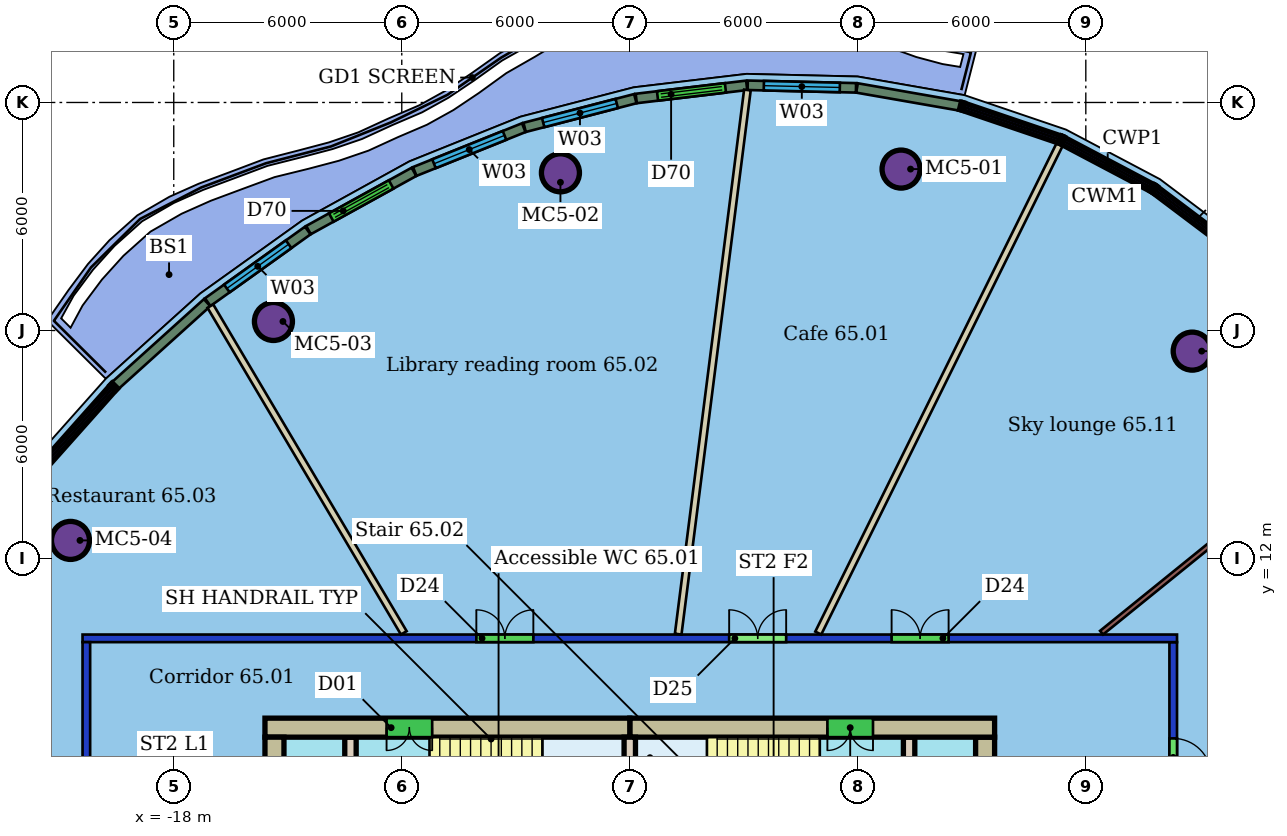
"""IFC4 building model, lengths in metres.
Left out: names, types, materials, properties, quantities, classifications, styles, units other than length and angle.
Written with IfcOpenShell. Run it as: python <this file> out.ifc"""

import sys

from ifc_helpers import new_model, si_unit, direction, frame, frame_2d, origin, origin_2d, place, context, subcontext, project, spatial, rectangle, hollow_circle, extrude, element, fill, save


model = new_model("IFC4")
c1 = context("Model", 3, precision=1e-05, world=origin(), true_north=direction((0.0, 1.0)))
c2 = subcontext(c1, "Body", "Model", "MODEL_VIEW")
j1 = project(units=[si_unit("LENGTHUNIT", "METRE"), si_unit("PLANEANGLEUNIT", "RADIAN")], contexts=[c1])
p1 = place(None, origin())
s1 = spatial("IfcSite", under=j1, at=p1, CompositionType="ELEMENT")
p2 = place(p1, origin())
s2 = spatial("IfcBuilding", under=s1, at=p2, CompositionType="ELEMENT")
p3 = place(p2, frame((0.0, 0.0, 264.9)))
s3 = spatial("IfcBuildingStorey", under=s2, at=p3, CompositionType="ELEMENT", Elevation=264.9)
for number, where, z_axis, x_axis in (
    (1, (1.138, 22.247, 0.0), (0.0, 0.0, 1.0), (1.0, 0.0, 0.0)),
    (2, (-7.825, 22.149, 0.0), (0.0, 0.0, 1.0), (1.0, 0.0, 0.0)),
    (3, (-15.377, 18.238, 0.0), (0.0, 0.0, 1.0), (1.0, 0.0, 0.0)),
    (4, (-20.718, 12.477, 0.0), (0.0, 0.0, 1.0), (1.0, 0.0, 0.0)),
    (5, (8.8, 17.457, 0.0), (0.0, 0.0, 1.0), (1.0, 0.0, 0.0)),
):
    element("IfcColumn", number, at=place(p3, frame(where, z_axis=z_axis, x_axis=x_axis)), inside=s3, PredefinedType="COLUMN", context=c2, shape_type="SweptSolid", body=[
        extrude(hollow_circle(Radius=0.5, WallThickness=0.04, at=origin_2d()), origin(), (0.0, 0.0, 1.0), 3.45),
    ])
p4 = place(p3, frame((-20.3, -9.8, 0.0), z_axis=(0.0, 0.0, 1.0), x_axis=(0.0, 1.0, 0.0)))
e6 = element("IfcWall", 6, at=p4, inside=s3, PredefinedType="PARTITIONING", context=c2, shape_type="SweptSolid", body=[
    extrude(rectangle(XDim=19.6, YDim=0.2, at=frame_2d((9.8, 0.0))), origin(), (0.0, 0.0, 1.0), 3.1),
])
p5 = place(p4, frame((13.483, 0.0, 0.0)))
e7 = element("IfcOpeningElement", 7, at=p5, cuts=e6, PredefinedType="OPENING", context=c2, shape_type="SweptSolid", body=[
    extrude(rectangle(XDim=1.5, YDim=2.4, at=frame_2d((0.75, 1.2))), frame((0.0, 0.11, 0.0), z_axis=(0.0, -1.0, 0.0), x_axis=(1.0, 0.0, 0.0)), (0.0, 0.0, 1.0), 0.22),
])
p6 = place(p4, frame((6.323, 0.0, 0.0)))
e8 = element("IfcOpeningElement", 8, at=p6, cuts=e6, PredefinedType="OPENING", context=c2, shape_type="SweptSolid", body=[
    extrude(rectangle(XDim=1.8, YDim=2.1, at=frame_2d((0.9, 1.05))), frame((0.0, 0.11, 0.0), z_axis=(0.0, -1.0, 0.0), x_axis=(1.0, 0.0, 0.0)), (0.0, 0.0, 1.0), 0.22),
])
p7 = place(p3, frame((-20.4, 9.9, 0.0), z_axis=(0.0, 0.0, 1.0), x_axis=(1.0, 0.0, 0.0)))
e9 = element("IfcWall", 9, at=p7, inside=s3, PredefinedType="PARTITIONING", context=c2, shape_type="SweptSolid", body=[
    extrude(rectangle(XDim=28.8, YDim=0.2, at=frame_2d((14.4, 0.0))), origin(), (0.0, 0.0, 1.0), 3.1),
])
p8 = place(p7, frame((17.015, 0.0, 0.0)))
e10 = element("IfcOpeningElement", 10, at=p8, cuts=e9, PredefinedType="OPENING", context=c2, shape_type="SweptSolid", body=[
    extrude(rectangle(XDim=1.5, YDim=2.4, at=frame_2d((0.75, 1.2))), frame((0.0, 0.11, 0.0), z_axis=(0.0, -1.0, 0.0), x_axis=(1.0, 0.0, 0.0)), (0.0, 0.0, 1.0), 0.22),
])
p9 = place(p7, frame((10.363, 0.0, 0.0)))
e11 = element("IfcOpeningElement", 11, at=p9, cuts=e9, PredefinedType="OPENING", context=c2, shape_type="SweptSolid", body=[
    extrude(rectangle(XDim=1.5, YDim=2.1, at=frame_2d((0.75, 1.05))), frame((0.0, 0.11, 0.0), z_axis=(0.0, -1.0, 0.0), x_axis=(1.0, 0.0, 0.0)), (0.0, 0.0, 1.0), 0.22),
])
p10 = place(p7, frame((21.29, 0.0, 0.0)))
e12 = element("IfcOpeningElement", 12, at=p10, cuts=e9, PredefinedType="OPENING", context=c2, shape_type="SweptSolid", body=[
    extrude(rectangle(XDim=1.5, YDim=2.1, at=frame_2d((0.75, 1.05))), frame((0.0, 0.11, 0.0), z_axis=(0.0, -1.0, 0.0), x_axis=(1.0, 0.0, 0.0)), (0.0, 0.0, 1.0), 0.22),
])
p11 = place(p3, frame((8.3, 9.8, 0.0), z_axis=(0.0, 0.0, 1.0), x_axis=(0.0, -1.0, 0.0)))
e13 = element("IfcWall", 13, at=p11, inside=s3, PredefinedType="PARTITIONING", context=c2, shape_type="SweptSolid", body=[
    extrude(rectangle(XDim=19.6, YDim=0.2, at=frame_2d((9.8, 0.0))), origin(), (0.0, 0.0, 1.0), 3.1),
])
p12 = place(p11, frame((7.946, 0.0, 0.0)))
e14 = element("IfcOpeningElement", 14, at=p12, cuts=e13, PredefinedType="OPENING", context=c2, shape_type="SweptSolid", body=[
    extrude(rectangle(XDim=1.8, YDim=2.4, at=frame_2d((0.9, 1.2))), frame((0.0, 0.11, 0.0), z_axis=(0.0, -1.0, 0.0), x_axis=(1.0, 0.0, 0.0)), (0.0, 0.0, 1.0), 0.22),
])
p13 = place(p11, frame((2.533, 0.0, 0.0)))
e15 = element("IfcOpeningElement", 15, at=p13, cuts=e13, PredefinedType="OPENING", context=c2, shape_type="SweptSolid", body=[
    extrude(rectangle(XDim=1.0, YDim=2.4, at=frame_2d((0.5, 1.2))), frame((0.0, 0.11, 0.0), z_axis=(0.0, -1.0, 0.0), x_axis=(1.0, 0.0, 0.0)), (0.0, 0.0, 1.0), 0.22),
])
p14 = place(p3, frame((5.312, 22.895, 0.0), z_axis=(0.0, 0.0, 1.0), x_axis=(-0.442945398148, -0.896548590016, 0.0)))
e16 = element("IfcWall", 16, at=p14, inside=s3, PredefinedType="PARTITIONING", context=c2, shape_type="SweptSolid", body=[
    extrude(rectangle(XDim=14.34, YDim=0.175, at=frame_2d((7.17, 0.0))), origin(), (0.0, 0.0, 1.0), 3.45),
])
p15 = place(p3, frame((-2.905, 24.328, 0.0), z_axis=(0.0, 0.0, 1.0), x_axis=(-0.126212209033, -0.992003265262, 0.0)))
e17 = element("IfcWall", 17, at=p15, inside=s3, PredefinedType="PARTITIONING", context=c2, shape_type="SweptSolid", body=[
    extrude(rectangle(XDim=14.432, YDim=0.175, at=frame_2d((7.216, 0.0))), origin(), (0.0, 0.0, 1.0), 3.45),
])
p16 = place(p3, frame((-17.037, 18.642, 0.0), z_axis=(0.0, 0.0, 1.0), x_axis=(0.509456059297, -0.860496672652, 0.0)))
e18 = element("IfcWall", 18, at=p16, inside=s3, PredefinedType="PARTITIONING", context=c2, shape_type="SweptSolid", body=[
    extrude(rectangle(XDim=9.991, YDim=0.175, at=frame_2d((4.996, 0.0))), origin(), (0.0, 0.0, 1.0), 3.45),
])
p17 = place(p3, frame((16.179, 7.409, 0.0), z_axis=(0.0, 0.0, 1.0), x_axis=(-0.948479442835, -0.316838675858, 0.0)))
e19 = element("IfcWall", 19, at=p17, inside=s3, PredefinedType="PARTITIONING", context=c2, shape_type="SweptSolid", body=[
    extrude(rectangle(XDim=8.152, YDim=0.3, at=frame_2d((4.076, 0.0))), origin(), (0.0, 0.0, 1.0), 3.45),
])
p18 = place(p3, frame((13.416, 15.716, 0.0), z_axis=(0.0, 0.0, 1.0), x_axis=(-0.777283998604, -0.629149891134, 0.0)))
e20 = element("IfcWall", 20, at=p18, inside=s3, PredefinedType="PARTITIONING", context=c2, shape_type="SweptSolid", body=[
    extrude(rectangle(XDim=9.009, YDim=0.125, at=frame_2d((4.504, 0.0))), origin(), (0.0, 0.0, 1.0), 3.45),
])
p19 = place(p3, frame((2.684, 23.91, 0.0), z_axis=(0.0, 0.0, 1.0), x_axis=(-0.985123538197, 0.171847649069, 0.0)))
e21 = element("IfcWall", 21, at=p19, inside=s3, PredefinedType="SOLIDWALL", context=c2, shape_type="SweptSolid", body=[
    extrude(rectangle(XDim=2.746, YDim=0.25, at=frame_2d((1.373, 0.0))), origin(), (0.0, 0.0, 1.0), 3.15),
])
p20 = place(p3, frame((-0.048, 24.385, 0.0), z_axis=(0.0, 0.0, 1.0), x_axis=(-0.999718659369, 0.023719235002, 0.0)))
e22 = element("IfcWall", 22, at=p20, inside=s3, PredefinedType="SOLIDWALL", context=c2, shape_type="SweptSolid", body=[
    extrude(rectangle(XDim=2.851, YDim=0.25, at=frame_2d((1.426, 0.0))), origin(), (0.0, 0.0, 1.0), 3.15),
])
p21 = place(p20, frame((0.426, 0.0, 0.9)))
e23 = element("IfcOpeningElement", 23, at=p21, cuts=e22, PredefinedType="OPENING", context=c2, shape_type="SweptSolid", body=[
    extrude(rectangle(XDim=2.0, YDim=2.1, at=frame_2d((1.0, 1.05))), frame((0.0, 0.135, 0.0), z_axis=(0.0, -1.0, 0.0), x_axis=(1.0, 0.0, 0.0)), (0.0, 0.0, 1.0), 0.27),
])
p22 = place(p3, frame((-2.924, 24.451, 0.0), z_axis=(0.0, 0.0, 1.0), x_axis=(-0.992981045758, -0.11827359285, 0.0)))
e24 = element("IfcWall", 24, at=p22, inside=s3, PredefinedType="SOLIDWALL", context=c2, shape_type="SweptSolid", body=[
    extrude(rectangle(XDim=2.927, YDim=0.25, at=frame_2d((1.463, 0.0))), origin(), (0.0, 0.0, 1.0), 3.15),
])
p23 = place(p22, frame((0.563, 0.0, 0.0)))
e25 = element("IfcOpeningElement", 25, at=p23, cuts=e24, PredefinedType="OPENING", context=c2, shape_type="SweptSolid", body=[
    extrude(rectangle(XDim=1.8, YDim=2.4, at=frame_2d((0.9, 1.2))), frame((0.0, 0.135, 0.0), z_axis=(0.0, -1.0, 0.0), x_axis=(1.0, 0.0, 0.0)), (0.0, 0.0, 1.0), 0.27),
])
p24 = place(p3, frame((-5.854, 24.1, 0.0), z_axis=(0.0, 0.0, 1.0), x_axis=(-0.967956734752, -0.25111702381, 0.0)))
e26 = element("IfcWall", 26, at=p24, inside=s3, PredefinedType="SOLIDWALL", context=c2, shape_type="SweptSolid", body=[
    extrude(rectangle(XDim=3.009, YDim=0.25, at=frame_2d((1.504, 0.0))), origin(), (0.0, 0.0, 1.0), 3.15),
])
p25 = place(p24, frame((0.505, 0.0, 0.9)))
e27 = element("IfcOpeningElement", 27, at=p25, cuts=e26, PredefinedType="OPENING", context=c2, shape_type="SweptSolid", body=[
    extrude(rectangle(XDim=2.0, YDim=2.1, at=frame_2d((1.0, 1.05))), frame((0.0, 0.135, 0.0), z_axis=(0.0, -1.0, 0.0), x_axis=(1.0, 0.0, 0.0)), (0.0, 0.0, 1.0), 0.27),
])
p26 = place(p3, frame((-8.79, 23.337, 0.0), z_axis=(0.0, 0.0, 1.0), x_axis=(-0.927849089634, -0.372955851093, 0.0)))
e28 = element("IfcWall", 28, at=p26, inside=s3, PredefinedType="SOLIDWALL", context=c2, shape_type="SweptSolid", body=[
    extrude(rectangle(XDim=3.092, YDim=0.25, at=frame_2d((1.546, 0.0))), origin(), (0.0, 0.0, 1.0), 3.15),
])
p27 = place(p26, frame((0.546, 0.0, 0.9)))
e29 = element("IfcOpeningElement", 29, at=p27, cuts=e28, PredefinedType="OPENING", context=c2, shape_type="SweptSolid", body=[
    extrude(rectangle(XDim=2.0, YDim=2.1, at=frame_2d((1.0, 1.05))), frame((0.0, 0.135, 0.0), z_axis=(0.0, -1.0, 0.0), x_axis=(1.0, 0.0, 0.0)), (0.0, 0.0, 1.0), 0.27),
])
p28 = place(p3, frame((-11.68, 22.174, 0.0), z_axis=(0.0, 0.0, 1.0), x_axis=(-0.875491155983, -0.483234141794, 0.0)))
e30 = element("IfcWall", 30, at=p28, inside=s3, PredefinedType="SOLIDWALL", context=c2, shape_type="SweptSolid", body=[
    extrude(rectangle(XDim=3.169, YDim=0.25, at=frame_2d((1.584, 0.0))), origin(), (0.0, 0.0, 1.0), 3.15),
])
p29 = place(p28, frame((0.685, 0.0, 0.0)))
e31 = element("IfcOpeningElement", 31, at=p29, cuts=e30, PredefinedType="OPENING", context=c2, shape_type="SweptSolid", body=[
    extrude(rectangle(XDim=1.8, YDim=2.4, at=frame_2d((0.9, 1.2))), frame((0.0, 0.135, 0.0), z_axis=(0.0, -1.0, 0.0), x_axis=(1.0, 0.0, 0.0)), (0.0, 0.0, 1.0), 0.27),
])
p30 = place(p3, frame((-14.474, 20.63, 0.0), z_axis=(0.0, 0.0, 1.0), x_axis=(-0.81314194721, -0.582065437634, 0.0)))
e32 = element("IfcWall", 32, at=p30, inside=s3, PredefinedType="SOLIDWALL", context=c2, shape_type="SweptSolid", body=[
    extrude(rectangle(XDim=3.237, YDim=0.25, at=frame_2d((1.619, 0.0))), origin(), (0.0, 0.0, 1.0), 3.15),
])
p31 = place(p30, frame((0.619, 0.0, 0.9)))
e33 = element("IfcOpeningElement", 33, at=p31, cuts=e32, PredefinedType="OPENING", context=c2, shape_type="SweptSolid", body=[
    extrude(rectangle(XDim=2.0, YDim=2.1, at=frame_2d((1.0, 1.05))), frame((0.0, 0.135, 0.0), z_axis=(0.0, -1.0, 0.0), x_axis=(1.0, 0.0, 0.0)), (0.0, 0.0, 1.0), 0.27),
])
p32 = place(p3, frame((-17.123, 18.732, 0.0), z_axis=(0.0, 0.0, 1.0), x_axis=(-0.7424824804, -0.669865483734, 0.0)))
e34 = element("IfcWall", 34, at=p32, inside=s3, PredefinedType="SOLIDWALL", context=c2, shape_type="SweptSolid", body=[
    extrude(rectangle(XDim=3.248, YDim=0.25, at=frame_2d((1.624, 0.0))), origin(), (0.0, 0.0, 1.0), 3.15),
])
p33 = place(p3, frame((3.6, 7.55, 0.0), z_axis=(0.0, 0.0, 1.0), x_axis=(-1.0, 0.0, 0.0)))
e35 = element("IfcWall", 35, at=p33, inside=s3, PredefinedType="SHEAR", context=c2, shape_type="SweptSolid", body=[
    extrude(rectangle(XDim=9.6, YDim=0.5, at=frame_2d((4.8, 0.0))), origin(), (0.0, 0.0, 1.0), 3.3),
])
p34 = place(p33, frame((3.2, 0.0, 0.0)))
e36 = element("IfcOpeningElement", 36, at=p34, cuts=e35, PredefinedType="OPENING", context=c2, shape_type="SweptSolid", body=[
    extrude(rectangle(XDim=1.2, YDim=2.1, at=frame_2d((0.6, 1.05))), frame((0.0, 0.26, 0.0), z_axis=(0.0, -1.0, 0.0), x_axis=(1.0, 0.0, 0.0)), (0.0, 0.0, 1.0), 0.52),
])
p35 = place(p3, frame((-6.0, 7.55, 0.0), z_axis=(0.0, 0.0, 1.0), x_axis=(-1.0, 0.0, 0.0)))
e37 = element("IfcWall", 37, at=p35, inside=s3, PredefinedType="SHEAR", context=c2, shape_type="SweptSolid", body=[
    extrude(rectangle(XDim=9.6, YDim=0.5, at=frame_2d((4.8, 0.0))), origin(), (0.0, 0.0, 1.0), 3.3),
])
p36 = place(p35, frame((5.2, 0.0, 0.0)))
e38 = element("IfcOpeningElement", 38, at=p36, cuts=e37, PredefinedType="OPENING", context=c2, shape_type="SweptSolid", body=[
    extrude(rectangle(XDim=1.2, YDim=2.1, at=frame_2d((0.6, 1.05))), frame((0.0, 0.26, 0.0), z_axis=(0.0, -1.0, 0.0), x_axis=(1.0, 0.0, 0.0)), (0.0, 0.0, 1.0), 0.52),
])
p37 = place(p3, frame((-15.35, 7.3, 0.0), z_axis=(0.0, 0.0, 1.0), x_axis=(0.0, -1.0, 0.0)))
e39 = element("IfcWall", 39, at=p37, inside=s3, PredefinedType="SHEAR", context=c2, shape_type="SweptSolid", body=[
    extrude(rectangle(XDim=14.6, YDim=0.5, at=frame_2d((7.3, 0.0))), origin(), (0.0, 0.0, 1.0), 3.3),
])
p38 = place(p37, frame((10.6, 0.0, 0.0)))
e40 = element("IfcOpeningElement", 40, at=p38, cuts=e39, PredefinedType="OPENING", context=c2, shape_type="SweptSolid", body=[
    extrude(rectangle(XDim=1.2, YDim=2.1, at=frame_2d((0.6, 1.05))), frame((0.0, 0.26, 0.0), z_axis=(0.0, -1.0, 0.0), x_axis=(1.0, 0.0, 0.0)), (0.0, 0.0, 1.0), 0.52),
])
p39 = place(p37, frame((2.8, 0.0, 0.0)))
e41 = element("IfcOpeningElement", 41, at=p39, cuts=e39, PredefinedType="OPENING", context=c2, shape_type="SweptSolid", body=[
    extrude(rectangle(XDim=1.2, YDim=2.1, at=frame_2d((0.6, 1.05))), frame((0.0, 0.26, 0.0), z_axis=(0.0, -1.0, 0.0), x_axis=(1.0, 0.0, 0.0)), (0.0, 0.0, 1.0), 0.52),
])
p40 = place(p3, frame((3.35, -7.3, 0.0), z_axis=(0.0, 0.0, 1.0), x_axis=(0.0, 1.0, 0.0)))
e42 = element("IfcWall", 42, at=p40, inside=s3, PredefinedType="SHEAR", context=c2, shape_type="SweptSolid", body=[
    extrude(rectangle(XDim=14.6, YDim=0.5, at=frame_2d((7.3, 0.0))), origin(), (0.0, 0.0, 1.0), 3.3),
])
p41 = place(p40, frame((2.8, 0.0, 0.0)))
e43 = element("IfcOpeningElement", 43, at=p41, cuts=e42, PredefinedType="OPENING", context=c2, shape_type="SweptSolid", body=[
    extrude(rectangle(XDim=1.2, YDim=2.1, at=frame_2d((0.6, 1.05))), frame((0.0, 0.26, 0.0), z_axis=(0.0, -1.0, 0.0), x_axis=(1.0, 0.0, 0.0)), (0.0, 0.0, 1.0), 0.52),
])
p42 = place(p40, frame((10.6, 0.0, 0.0)))
e44 = element("IfcOpeningElement", 44, at=p42, cuts=e42, PredefinedType="OPENING", context=c2, shape_type="SweptSolid", body=[
    extrude(rectangle(XDim=1.2, YDim=2.1, at=frame_2d((0.6, 1.05))), frame((0.0, 0.26, 0.0), z_axis=(0.0, -1.0, 0.0), x_axis=(1.0, 0.0, 0.0)), (0.0, 0.0, 1.0), 0.52),
])
p43 = place(p3, frame((-13.35, 7.3, 0.0), z_axis=(0.0, 0.0, 1.0), x_axis=(0.0, -1.0, 0.0)))
e45 = element("IfcWall", 45, at=p43, inside=s3, PredefinedType="SHEAR", context=c2, shape_type="SweptSolid", body=[
    extrude(rectangle(XDim=14.6, YDim=0.3, at=frame_2d((7.3, 0.0))), origin(), (0.0, 0.0, 1.0), 3.3),
])
p44 = place(p43, frame((6.55, 0.0, 0.0)))
e46 = element("IfcOpeningElement", 46, at=p44, cuts=e45, PredefinedType="OPENING", context=c2, shape_type="SweptSolid", body=[
    extrude(rectangle(XDim=1.5, YDim=2.1, at=frame_2d((0.75, 1.05))), frame((0.0, 0.16, 0.0), z_axis=(0.0, -1.0, 0.0), x_axis=(1.0, 0.0, 0.0)), (0.0, 0.0, 1.0), 0.32),
])
p45 = place(p3, frame((1.35, -7.3, 0.0), z_axis=(0.0, 0.0, 1.0), x_axis=(0.0, 1.0, 0.0)))
e47 = element("IfcWall", 47, at=p45, inside=s3, PredefinedType="SHEAR", context=c2, shape_type="SweptSolid", body=[
    extrude(rectangle(XDim=14.6, YDim=0.3, at=frame_2d((7.3, 0.0))), origin(), (0.0, 0.0, 1.0), 3.3),
])
p46 = place(p45, frame((1.21, 0.0, 0.0)))
e48 = element("IfcOpeningElement", 48, at=p46, cuts=e47, PredefinedType="OPENING", context=c2, shape_type="SweptSolid", body=[
    extrude(rectangle(XDim=1.0, YDim=2.1, at=frame_2d((0.5, 1.05))), frame((0.0, 0.16, 0.0), z_axis=(0.0, -1.0, 0.0), x_axis=(1.0, 0.0, 0.0)), (0.0, 0.0, 1.0), 0.32),
])
p47 = place(p45, frame((6.55, 0.0, 0.0)))
e49 = element("IfcOpeningElement", 49, at=p47, cuts=e47, PredefinedType="OPENING", context=c2, shape_type="SweptSolid", body=[
    extrude(rectangle(XDim=1.5, YDim=2.1, at=frame_2d((0.75, 1.05))), frame((0.0, 0.16, 0.0), z_axis=(0.0, -1.0, 0.0), x_axis=(1.0, 0.0, 0.0)), (0.0, 0.0, 1.0), 0.32),
])
p48 = place(p3, frame((-6.0, 3.88, 0.0), z_axis=(0.0, 0.0, 1.0), x_axis=(0.0, 1.0, 0.0)))
e50 = element("IfcWall", 50, at=p48, inside=s3, PredefinedType="SHEAR", context=c2, shape_type="SweptSolid", body=[
    extrude(rectangle(XDim=3.42, YDim=0.3, at=frame_2d((1.71, 0.0))), origin(), (0.0, 0.0, 1.0), 3.3),
])
p49 = place(p8, origin())
e51 = element("IfcDoor", 51, at=p49, inside=s3, OperationType="DOUBLE_DOOR_SINGLE_SWING", PredefinedType="DOOR", context=c2, shape_type="SweptSolid", body=[
    extrude(rectangle(XDim=1.5, YDim=2.4, at=frame_2d((0.75, 1.2))), frame((0.0, 0.025, 0.0), z_axis=(0.0, -1.0, 0.0), x_axis=(1.0, 0.0, 0.0)), (0.0, 0.0, 1.0), 0.05),
])
fill(e10, e51)
p50 = place(p9, origin())
e52 = element("IfcDoor", 52, at=p50, inside=s3, OperationType="DOUBLE_DOOR_SINGLE_SWING", PredefinedType="DOOR", context=c2, shape_type="SweptSolid", body=[
    extrude(rectangle(XDim=1.5, YDim=2.1, at=frame_2d((0.75, 1.05))), frame((0.0, 0.025, 0.0), z_axis=(0.0, -1.0, 0.0), x_axis=(1.0, 0.0, 0.0)), (0.0, 0.0, 1.0), 0.05),
])
fill(e11, e52)
p51 = place(p13, origin())
e53 = element("IfcDoor", 53, at=p51, inside=s3, OperationType="SINGLE_SWING_RIGHT", PredefinedType="DOOR", context=c2, shape_type="SweptSolid", body=[
    extrude(rectangle(XDim=1.0, YDim=2.4, at=frame_2d((0.5, 1.2))), frame((0.0, 0.025, 0.0), z_axis=(0.0, -1.0, 0.0), x_axis=(1.0, 0.0, 0.0)), (0.0, 0.0, 1.0), 0.05),
])
fill(e15, e53)
p52 = place(p10, origin())
e54 = element("IfcDoor", 54, at=p52, inside=s3, OperationType="DOUBLE_DOOR_SINGLE_SWING", PredefinedType="DOOR", context=c2, shape_type="SweptSolid", body=[
    extrude(rectangle(XDim=1.5, YDim=2.1, at=frame_2d((0.75, 1.05))), frame((0.0, 0.025, 0.0), z_axis=(0.0, -1.0, 0.0), x_axis=(1.0, 0.0, 0.0)), (0.0, 0.0, 1.0), 0.05),
])
fill(e12, e54)
p53 = place(p21, origin())
e55 = element("IfcWindow", 55, at=p53, inside=s3, PartitioningType="SINGLE_PANEL", PredefinedType="WINDOW", context=c2, shape_type="SweptSolid", body=[
    extrude(rectangle(XDim=2.0, YDim=2.1, at=frame_2d((1.0, 1.05))), frame((0.0, 0.03, 0.0), z_axis=(0.0, -1.0, 0.0), x_axis=(1.0, 0.0, 0.0)), (0.0, 0.0, 1.0), 0.06),
])
fill(e23, e55)
p54 = place(p23, origin())
e56 = element("IfcDoor", 56, at=p54, inside=s3, OperationType="DOUBLE_DOOR_SLIDING", PredefinedType="DOOR", context=c2, shape_type="SweptSolid", body=[
    extrude(rectangle(XDim=1.8, YDim=2.4, at=frame_2d((0.9, 1.2))), frame((0.0, 0.025, 0.0), z_axis=(0.0, -1.0, 0.0), x_axis=(1.0, 0.0, 0.0)), (0.0, 0.0, 1.0), 0.05),
])
fill(e25, e56)
p55 = place(p25, origin())
e57 = element("IfcWindow", 57, at=p55, inside=s3, PartitioningType="SINGLE_PANEL", PredefinedType="WINDOW", context=c2, shape_type="SweptSolid", body=[
    extrude(rectangle(XDim=2.0, YDim=2.1, at=frame_2d((1.0, 1.05))), frame((0.0, 0.03, 0.0), z_axis=(0.0, -1.0, 0.0), x_axis=(1.0, 0.0, 0.0)), (0.0, 0.0, 1.0), 0.06),
])
fill(e27, e57)
p56 = place(p27, origin())
e58 = element("IfcWindow", 58, at=p56, inside=s3, PartitioningType="SINGLE_PANEL", PredefinedType="WINDOW", context=c2, shape_type="SweptSolid", body=[
    extrude(rectangle(XDim=2.0, YDim=2.1, at=frame_2d((1.0, 1.05))), frame((0.0, 0.03, 0.0), z_axis=(0.0, -1.0, 0.0), x_axis=(1.0, 0.0, 0.0)), (0.0, 0.0, 1.0), 0.06),
])
fill(e29, e58)
p57 = place(p29, origin())
e59 = element("IfcDoor", 59, at=p57, inside=s3, OperationType="DOUBLE_DOOR_SLIDING", PredefinedType="DOOR", context=c2, shape_type="SweptSolid", body=[
    extrude(rectangle(XDim=1.8, YDim=2.4, at=frame_2d((0.9, 1.2))), frame((0.0, 0.025, 0.0), z_axis=(0.0, -1.0, 0.0), x_axis=(1.0, 0.0, 0.0)), (0.0, 0.0, 1.0), 0.05),
])
fill(e31, e59)
p58 = place(p31, origin())
e60 = element("IfcWindow", 60, at=p58, inside=s3, PartitioningType="SINGLE_PANEL", PredefinedType="WINDOW", context=c2, shape_type="SweptSolid", body=[
    extrude(rectangle(XDim=2.0, YDim=2.1, at=frame_2d((1.0, 1.05))), frame((0.0, 0.03, 0.0), z_axis=(0.0, -1.0, 0.0), x_axis=(1.0, 0.0, 0.0)), (0.0, 0.0, 1.0), 0.06),
])
fill(e33, e60)
p59 = place(p34, origin())
e61 = element("IfcDoor", 61, at=p59, inside=s3, OperationType="DOUBLE_DOOR_SINGLE_SWING", PredefinedType="NOTDEFINED", context=c2, shape_type="SweptSolid", body=[
    extrude(rectangle(XDim=1.2, YDim=2.1, at=frame_2d((0.6, 1.05))), frame((0.0, 0.025, 0.0), z_axis=(0.0, -1.0, 0.0), x_axis=(1.0, 0.0, 0.0)), (0.0, 0.0, 1.0), 0.05),
])
fill(e36, e61)
p60 = place(p36, origin())
e62 = element("IfcDoor", 62, at=p60, inside=s3, OperationType="DOUBLE_DOOR_SINGLE_SWING", PredefinedType="NOTDEFINED", context=c2, shape_type="SweptSolid", body=[
    extrude(rectangle(XDim=1.2, YDim=2.1, at=frame_2d((0.6, 1.05))), frame((0.0, 0.025, 0.0), z_axis=(0.0, -1.0, 0.0), x_axis=(1.0, 0.0, 0.0)), (0.0, 0.0, 1.0), 0.05),
])
fill(e38, e62)
save(model, sys.argv[1])
